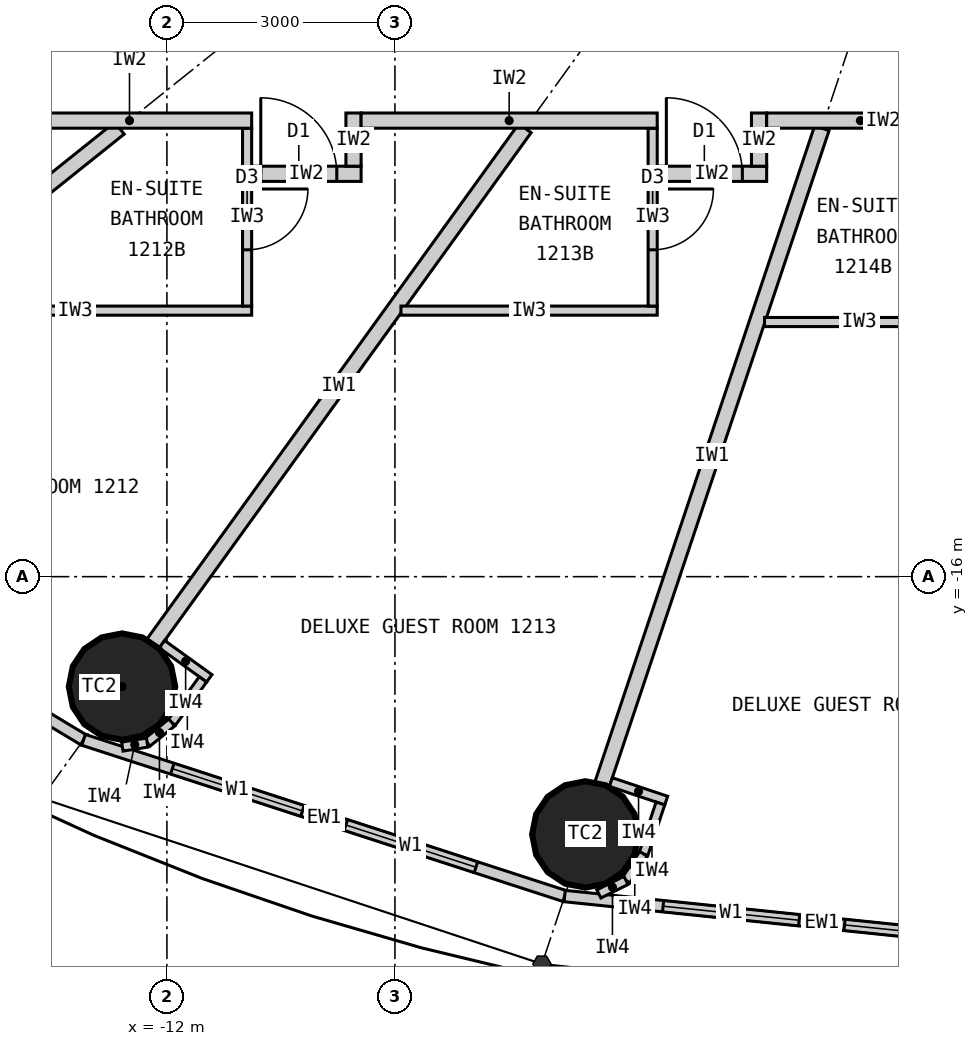
"""IFC4 building model, lengths in metres.
Left out: names, types, materials, properties, quantities, classifications, styles, units other than length and angle.
Written with IfcOpenShell. Run it as: python <this file> out.ifc"""

import sys

from ifc_helpers import new_model, si_unit, direction, frame, frame_2d, origin, origin_2d, place, context, subcontext, project, spatial, rectangle, circle, extrude, element, fill, save


model = new_model("IFC4")
c1 = context("Model", 3, precision=1e-05, world=origin(), true_north=direction((0.0, 1.0)))
c2 = subcontext(c1, "Body", "Model", "MODEL_VIEW")
j1 = project(units=[si_unit("LENGTHUNIT", "METRE"), si_unit("PLANEANGLEUNIT", "RADIAN")], contexts=[c1])
p1 = place(None, origin())
s1 = spatial("IfcSite", under=j1, at=p1, CompositionType="ELEMENT")
p2 = place(p1, origin())
s2 = spatial("IfcBuilding", under=s1, at=p2, CompositionType="ELEMENT")
p3 = place(p2, frame((0.0, 0.0, 54.0)))
s3 = spatial("IfcBuildingStorey", under=s2, at=p3, CompositionType="ELEMENT", Elevation=54.0)
for number, where, z_axis, x_axis in (
    (1, (-12.591, -17.447, 0.0), (0.0, 0.0, 1.0), (1.0, 0.0, 0.0)),
    (2, (-6.495, -19.391, 0.0), (0.0, 0.0, 1.0), (1.0, 0.0, 0.0)),
):
    element("IfcColumn", number, at=place(p3, frame(where, z_axis=z_axis, x_axis=x_axis)), inside=s3, PredefinedType="COLUMN", context=c2, shape_type="SweptSolid", body=[
        extrude(circle(Radius=0.7, at=origin_2d()), origin(), (0.0, 0.0, 1.0), 3.3),
    ])
p4 = place(p3, frame((-18.57, -14.856, 0.0), z_axis=(0.0, 0.0, 1.0), x_axis=(0.856983180864, -0.515344377787, 0.0)))
e3 = element("IfcWall", 3, at=p4, inside=s3, PredefinedType="ELEMENTEDWALL", context=c2, shape_type="SweptSolid", body=[
    extrude(rectangle(XDim=6.386, YDim=0.15, at=frame_2d((3.193, 0.0))), origin(), (0.0, 0.0, 1.0), 3.12),
])
p5 = place(p4, frame((1.093, 0.0, 0.9)))
e4 = element("IfcOpeningElement", 4, at=p5, cuts=e3, PredefinedType="OPENING", context=c2, shape_type="SweptSolid", body=[
    extrude(rectangle(XDim=1.8, YDim=1.9, at=frame_2d((0.9, 0.95))), frame((0.0, 0.085, 0.0), z_axis=(0.0, -1.0, 0.0), x_axis=(1.0, 0.0, 0.0)), (0.0, 0.0, 1.0), 0.17),
])
p6 = place(p4, frame((3.493, 0.0, 0.9)))
e5 = element("IfcOpeningElement", 5, at=p6, cuts=e3, PredefinedType="OPENING", context=c2, shape_type="SweptSolid", body=[
    extrude(rectangle(XDim=1.8, YDim=1.9, at=frame_2d((0.9, 0.95))), frame((0.0, 0.085, 0.0), z_axis=(0.0, -1.0, 0.0), x_axis=(1.0, 0.0, 0.0)), (0.0, 0.0, 1.0), 0.17),
])
p7 = place(p3, frame((-13.096, -18.147, 0.0), z_axis=(0.0, 0.0, 1.0), x_axis=(0.951137534625, -0.308767534285, 0.0)))
e6 = element("IfcWall", 6, at=p7, inside=s3, PredefinedType="ELEMENTEDWALL", context=c2, shape_type="SweptSolid", body=[
    extrude(rectangle(XDim=6.655, YDim=0.15, at=frame_2d((3.328, 0.0))), origin(), (0.0, 0.0, 1.0), 3.12),
])
p8 = place(p7, frame((1.228, 0.0, 0.9)))
e7 = element("IfcOpeningElement", 7, at=p8, cuts=e6, PredefinedType="OPENING", context=c2, shape_type="SweptSolid", body=[
    extrude(rectangle(XDim=1.8, YDim=1.9, at=frame_2d((0.9, 0.95))), frame((0.0, 0.085, 0.0), z_axis=(0.0, -1.0, 0.0), x_axis=(1.0, 0.0, 0.0)), (0.0, 0.0, 1.0), 0.17),
])
p9 = place(p7, frame((3.628, 0.0, 0.9)))
e8 = element("IfcOpeningElement", 8, at=p9, cuts=e6, PredefinedType="OPENING", context=c2, shape_type="SweptSolid", body=[
    extrude(rectangle(XDim=1.8, YDim=1.9, at=frame_2d((0.9, 0.95))), frame((0.0, 0.085, 0.0), z_axis=(0.0, -1.0, 0.0), x_axis=(1.0, 0.0, 0.0)), (0.0, 0.0, 1.0), 0.17),
])
p10 = place(p3, frame((-6.766, -20.202, 0.0), z_axis=(0.0, 0.0, 1.0), x_axis=(0.994721394369, -0.102612609291, 0.0)))
e9 = element("IfcWall", 9, at=p10, inside=s3, PredefinedType="ELEMENTEDWALL", context=c2, shape_type="SweptSolid", body=[
    extrude(rectangle(XDim=6.802, YDim=0.15, at=frame_2d((3.401, 0.0))), origin(), (0.0, 0.0, 1.0), 3.12),
])
p11 = place(p10, frame((1.301, 0.0, 0.9)))
e10 = element("IfcOpeningElement", 10, at=p11, cuts=e9, PredefinedType="OPENING", context=c2, shape_type="SweptSolid", body=[
    extrude(rectangle(XDim=1.8, YDim=1.9, at=frame_2d((0.9, 0.95))), frame((0.0, 0.085, 0.0), z_axis=(0.0, -1.0, 0.0), x_axis=(1.0, 0.0, 0.0)), (0.0, 0.0, 1.0), 0.17),
])
p12 = place(p10, frame((3.701, 0.0, 0.9)))
e11 = element("IfcOpeningElement", 11, at=p12, cuts=e9, PredefinedType="OPENING", context=c2, shape_type="SweptSolid", body=[
    extrude(rectangle(XDim=1.8, YDim=1.9, at=frame_2d((0.9, 0.95))), frame((0.0, 0.085, 0.0), z_axis=(0.0, -1.0, 0.0), x_axis=(1.0, 0.0, 0.0)), (0.0, 0.0, 1.0), 0.17),
])
p13 = place(p3, frame((-12.625, -10.1, 0.0), z_axis=(0.0, 0.0, 1.0), x_axis=(-0.780892451574, -0.624665493744, 0.0)))
e12 = element("IfcWall", 12, at=p13, inside=s3, PredefinedType="PARTITIONING", context=c2, shape_type="SweptSolid", body=[
    extrude(rectangle(XDim=6.045, YDim=0.2, at=frame_2d((3.022, 0.0))), origin(), (0.0, 0.0, 1.0), 2.32),
])
p14 = place(p3, frame((-7.289, -10.1, 0.0), z_axis=(0.0, 0.0, 1.0), x_axis=(-0.585198353053, -0.810890182197, 0.0)))
e13 = element("IfcWall", 13, at=p14, inside=s3, PredefinedType="PARTITIONING", context=c2, shape_type="SweptSolid", body=[
    extrude(rectangle(XDim=8.36, YDim=0.2, at=frame_2d((4.18, 0.0))), origin(), (0.0, 0.0, 1.0), 2.32),
])
p15 = place(p3, frame((-3.383, -10.1, 0.0), z_axis=(0.0, 0.0, 1.0), x_axis=(-0.31759592231, -0.948226149256, 0.0)))
e14 = element("IfcWall", 14, at=p15, inside=s3, PredefinedType="PARTITIONING", context=c2, shape_type="SweptSolid", body=[
    extrude(rectangle(XDim=9.098, YDim=0.2, at=frame_2d((4.549, 0.0))), origin(), (0.0, 0.0, 1.0), 2.32),
])
p16 = place(p3, frame((-15.525, -12.5, 0.0), z_axis=(0.0, 0.0, 1.0), x_axis=(1.0, 0.0, 0.0)))
e15 = element("IfcWall", 15, at=p16, inside=s3, PredefinedType="PARTITIONING", context=c2, shape_type="SweptSolid", body=[
    extrude(rectangle(XDim=4.64, YDim=0.12, at=frame_2d((2.32, 0.0))), origin(), (0.0, 0.0, 1.0), 3.12),
])
p17 = place(p3, frame((-10.945, -10.1, 0.0), z_axis=(0.0, 0.0, 1.0), x_axis=(0.0, -1.0, 0.0)))
e16 = element("IfcWall", 16, at=p17, inside=s3, PredefinedType="PARTITIONING", context=c2, shape_type="SweptSolid", body=[
    extrude(rectangle(XDim=2.34, YDim=0.12, at=frame_2d((1.17, 0.0))), origin(), (0.0, 0.0, 1.0), 3.12),
])
p18 = place(p17, frame((0.8, 0.0, 0.0)))
e17 = element("IfcOpeningElement", 17, at=p18, cuts=e16, PredefinedType="OPENING", context=c2, shape_type="SweptSolid", body=[
    extrude(rectangle(XDim=0.8, YDim=2.1, at=frame_2d((0.4, 1.05))), frame((0.0, 0.07, 0.0), z_axis=(0.0, -1.0, 0.0), x_axis=(1.0, 0.0, 0.0)), (0.0, 0.0, 1.0), 0.14),
])
p19 = place(p3, frame((-8.921, -12.5, 0.0), z_axis=(0.0, 0.0, 1.0), x_axis=(1.0, 0.0, 0.0)))
e18 = element("IfcWall", 18, at=p19, inside=s3, PredefinedType="PARTITIONING", context=c2, shape_type="SweptSolid", body=[
    extrude(rectangle(XDim=3.372, YDim=0.12, at=frame_2d((1.686, 0.0))), origin(), (0.0, 0.0, 1.0), 3.12),
])
p20 = place(p3, frame((-5.609, -10.1, 0.0), z_axis=(0.0, 0.0, 1.0), x_axis=(0.0, -1.0, 0.0)))
e19 = element("IfcWall", 19, at=p20, inside=s3, PredefinedType="PARTITIONING", context=c2, shape_type="SweptSolid", body=[
    extrude(rectangle(XDim=2.34, YDim=0.12, at=frame_2d((1.17, 0.0))), origin(), (0.0, 0.0, 1.0), 3.12),
])
p21 = place(p20, frame((0.8, 0.0, 0.0)))
e20 = element("IfcOpeningElement", 20, at=p21, cuts=e19, PredefinedType="OPENING", context=c2, shape_type="SweptSolid", body=[
    extrude(rectangle(XDim=0.8, YDim=2.1, at=frame_2d((0.4, 1.05))), frame((0.0, 0.07, 0.0), z_axis=(0.0, -1.0, 0.0), x_axis=(1.0, 0.0, 0.0)), (0.0, 0.0, 1.0), 0.14),
])
p22 = place(p3, frame((-4.137, -12.65, 0.0), z_axis=(0.0, 0.0, 1.0), x_axis=(1.0, 0.0, 0.0)))
e21 = element("IfcWall", 21, at=p22, inside=s3, PredefinedType="PARTITIONING", context=c2, shape_type="SweptSolid", body=[
    extrude(rectangle(XDim=2.494, YDim=0.12, at=frame_2d((1.247, 0.0))), origin(), (0.0, 0.0, 1.0), 3.12),
])
p23 = place(p3, frame((-9.445, -10.7, 0.0), z_axis=(0.0, 0.0, 1.0), x_axis=(-1.0, 0.0, 0.0)))
e22 = element("IfcWall", 22, at=p23, inside=s3, PredefinedType="PARTITIONING", context=c2, shape_type="SweptSolid", body=[
    extrude(rectangle(XDim=1.44, YDim=0.2, at=frame_2d((0.72, 0.0))), origin(), (0.0, 0.0, 1.0), 3.12),
])
p24 = place(p23, frame((0.32, 0.0, 0.0)))
e23 = element("IfcOpeningElement", 23, at=p24, cuts=e22, PredefinedType="OPENING", context=c2, shape_type="SweptSolid", body=[
    extrude(rectangle(XDim=1.0, YDim=2.2, at=frame_2d((0.5, 1.1))), frame((0.0, 0.11, 0.0), z_axis=(0.0, -1.0, 0.0), x_axis=(1.0, 0.0, 0.0)), (0.0, 0.0, 1.0), 0.22),
])
p25 = place(p3, frame((-9.545, -9.9, 0.0), z_axis=(0.0, 0.0, 1.0), x_axis=(0.0, -1.0, 0.0)))
e24 = element("IfcWall", 24, at=p25, inside=s3, PredefinedType="PARTITIONING", context=c2, shape_type="SweptSolid", body=[
    extrude(rectangle(XDim=0.7, YDim=0.2, at=frame_2d((0.35, 0.0))), origin(), (0.0, 0.0, 1.0), 3.12),
])
p26 = place(p3, frame((-4.109, -10.7, 0.0), z_axis=(0.0, 0.0, 1.0), x_axis=(-1.0, 0.0, 0.0)))
e25 = element("IfcWall", 25, at=p26, inside=s3, PredefinedType="PARTITIONING", context=c2, shape_type="SweptSolid", body=[
    extrude(rectangle(XDim=1.44, YDim=0.2, at=frame_2d((0.72, 0.0))), origin(), (0.0, 0.0, 1.0), 3.12),
])
p27 = place(p26, frame((0.32, 0.0, 0.0)))
e26 = element("IfcOpeningElement", 26, at=p27, cuts=e25, PredefinedType="OPENING", context=c2, shape_type="SweptSolid", body=[
    extrude(rectangle(XDim=1.0, YDim=2.2, at=frame_2d((0.5, 1.1))), frame((0.0, 0.11, 0.0), z_axis=(0.0, -1.0, 0.0), x_axis=(1.0, 0.0, 0.0)), (0.0, 0.0, 1.0), 0.22),
])
p28 = place(p3, frame((-4.209, -9.9, 0.0), z_axis=(0.0, 0.0, 1.0), x_axis=(0.0, -1.0, 0.0)))
e27 = element("IfcWall", 27, at=p28, inside=s3, PredefinedType="PARTITIONING", context=c2, shape_type="SweptSolid", body=[
    extrude(rectangle(XDim=0.7, YDim=0.2, at=frame_2d((0.35, 0.0))), origin(), (0.0, 0.0, 1.0), 3.12),
])
p29 = place(p3, frame((-1.643, -10.0, 0.0), z_axis=(0.0, 0.0, 1.0), x_axis=(-1.0, 0.0, 0.0)))
e28 = element("IfcWall", 28, at=p29, inside=s3, PredefinedType="PARTITIONING", context=c2, shape_type="SweptSolid", body=[
    extrude(rectangle(XDim=2.466, YDim=0.2, at=frame_2d((1.233, 0.0))), origin(), (0.0, 0.0, 1.0), 3.12),
])
p30 = place(p3, frame((-5.549, -10.0, 0.0), z_axis=(0.0, 0.0, 1.0), x_axis=(-1.0, 0.0, 0.0)))
e29 = element("IfcWall", 29, at=p30, inside=s3, PredefinedType="PARTITIONING", context=c2, shape_type="SweptSolid", body=[
    extrude(rectangle(XDim=3.896, YDim=0.2, at=frame_2d((1.948, 0.0))), origin(), (0.0, 0.0, 1.0), 3.12),
])
p31 = place(p3, frame((-10.885, -10.0, 0.0), z_axis=(0.0, 0.0, 1.0), x_axis=(-1.0, 0.0, 0.0)))
e30 = element("IfcWall", 30, at=p31, inside=s3, PredefinedType="PARTITIONING", context=c2, shape_type="SweptSolid", body=[
    extrude(rectangle(XDim=3.215, YDim=0.2, at=frame_2d((1.607, 0.0))), origin(), (0.0, 0.0, 1.0), 3.12),
])
p32 = place(p3, frame((-12.065, -16.889, 0.0), z_axis=(0.0, 0.0, 1.0), x_axis=(0.810821798253, -0.585293098778, 0.0)))
e31 = element("IfcWall", 31, at=p32, inside=s3, PredefinedType="PARTITIONING", context=c2, shape_type="SweptSolid", body=[
    extrude(rectangle(XDim=0.768, YDim=0.12, at=frame_2d((0.384, 0.0))), origin(), (0.0, 0.0, 1.0), 3.12),
])
p33 = place(p3, frame((-11.526, -17.351, 0.0), z_axis=(0.0, 0.0, 1.0), x_axis=(-0.585223113993, -0.810872312296, 0.0)))
e32 = element("IfcWall", 32, at=p33, inside=s3, PredefinedType="PARTITIONING", context=c2, shape_type="SweptSolid", body=[
    extrude(rectangle(XDim=0.7, YDim=0.12, at=frame_2d((0.35, 0.0))), origin(), (0.0, 0.0, 1.0), 3.12),
])
p34 = place(p3, frame((-11.936, -17.919, 0.0), z_axis=(0.0, 0.0, 1.0), x_axis=(-0.775023088441, -0.631932917629, 0.0)))
e33 = element("IfcWall", 33, at=p34, inside=s3, PredefinedType="PARTITIONING", context=c2, shape_type="SweptSolid", body=[
    extrude(rectangle(XDim=0.418, YDim=0.12, at=frame_2d((0.209, 0.0))), origin(), (0.0, 0.0, 1.0), 3.12),
])
p35 = place(p3, frame((-12.26, -18.183, 0.0), z_axis=(0.0, 0.0, 1.0), x_axis=(-0.987218661664, -0.159371622511, 0.0)))
e34 = element("IfcWall", 34, at=p35, inside=s3, PredefinedType="PARTITIONING", context=c2, shape_type="SweptSolid", body=[
    extrude(rectangle(XDim=0.331, YDim=0.12, at=frame_2d((0.166, 0.0))), origin(), (0.0, 0.0, 1.0), 3.12),
])
p36 = place(p3, frame((-6.159, -18.702, 0.0), z_axis=(0.0, 0.0, 1.0), x_axis=(0.948173154049, -0.31775410295, 0.0)))
e35 = element("IfcWall", 35, at=p36, inside=s3, PredefinedType="PARTITIONING", context=c2, shape_type="SweptSolid", body=[
    extrude(rectangle(XDim=0.768, YDim=0.12, at=frame_2d((0.384, 0.0))), origin(), (0.0, 0.0, 1.0), 3.12),
])
p37 = place(p3, frame((-5.507, -18.984, 0.0), z_axis=(0.0, 0.0, 1.0), x_axis=(-0.317692050622, -0.948193946918, 0.0)))
e36 = element("IfcWall", 36, at=p37, inside=s3, PredefinedType="PARTITIONING", context=c2, shape_type="SweptSolid", body=[
    extrude(rectangle(XDim=0.7, YDim=0.12, at=frame_2d((0.35, 0.0))), origin(), (0.0, 0.0, 1.0), 3.12),
])
p38 = place(p3, frame((-5.729, -19.648, 0.0), z_axis=(0.0, 0.0, 1.0), x_axis=(-0.552135764955, -0.833754218615, 0.0)))
e37 = element("IfcWall", 37, at=p38, inside=s3, PredefinedType="PARTITIONING", context=c2, shape_type="SweptSolid", body=[
    extrude(rectangle(XDim=0.418, YDim=0.12, at=frame_2d((0.209, 0.0))), origin(), (0.0, 0.0, 1.0), 3.12),
])
p39 = place(p3, frame((-5.96, -19.996, 0.0), z_axis=(0.0, 0.0, 1.0), x_axis=(-0.895160725913, -0.445743507842, 0.0)))
e38 = element("IfcWall", 38, at=p39, inside=s3, PredefinedType="PARTITIONING", context=c2, shape_type="SweptSolid", body=[
    extrude(rectangle(XDim=0.399, YDim=0.12, at=frame_2d((0.199, 0.0))), origin(), (0.0, 0.0, 1.0), 3.12),
])
p40 = place(p8, origin())
e39 = element("IfcWindow", 39, at=p40, inside=s3, PartitioningType="SINGLE_PANEL", PredefinedType="WINDOW", context=c2, shape_type="SweptSolid", body=[
    extrude(rectangle(XDim=1.8, YDim=1.9, at=frame_2d((0.9, 0.95))), frame((0.0, 0.03, 0.0), z_axis=(0.0, -1.0, 0.0), x_axis=(1.0, 0.0, 0.0)), (0.0, 0.0, 1.0), 0.06),
])
fill(e7, e39)
p41 = place(p9, origin())
e40 = element("IfcWindow", 40, at=p41, inside=s3, PartitioningType="SINGLE_PANEL", PredefinedType="WINDOW", context=c2, shape_type="SweptSolid", body=[
    extrude(rectangle(XDim=1.8, YDim=1.9, at=frame_2d((0.9, 0.95))), frame((0.0, 0.03, 0.0), z_axis=(0.0, -1.0, 0.0), x_axis=(1.0, 0.0, 0.0)), (0.0, 0.0, 1.0), 0.06),
])
fill(e8, e40)
p42 = place(p11, origin())
e41 = element("IfcWindow", 41, at=p42, inside=s3, PartitioningType="SINGLE_PANEL", PredefinedType="WINDOW", context=c2, shape_type="SweptSolid", body=[
    extrude(rectangle(XDim=1.8, YDim=1.9, at=frame_2d((0.9, 0.95))), frame((0.0, 0.03, 0.0), z_axis=(0.0, -1.0, 0.0), x_axis=(1.0, 0.0, 0.0)), (0.0, 0.0, 1.0), 0.06),
])
fill(e10, e41)
p43 = place(p12, origin())
e42 = element("IfcWindow", 42, at=p43, inside=s3, PartitioningType="SINGLE_PANEL", PredefinedType="WINDOW", context=c2, shape_type="SweptSolid", body=[
    extrude(rectangle(XDim=1.8, YDim=1.9, at=frame_2d((0.9, 0.95))), frame((0.0, 0.03, 0.0), z_axis=(0.0, -1.0, 0.0), x_axis=(1.0, 0.0, 0.0)), (0.0, 0.0, 1.0), 0.06),
])
fill(e11, e42)
p44 = place(p18, origin())
e43 = element("IfcDoor", 43, at=p44, inside=s3, OperationType="SINGLE_SWING_LEFT", PredefinedType="DOOR", context=c2, shape_type="SweptSolid", body=[
    extrude(rectangle(XDim=0.8, YDim=2.1, at=frame_2d((0.4, 1.05))), frame((0.0, 0.025, 0.0), z_axis=(0.0, -1.0, 0.0), x_axis=(1.0, 0.0, 0.0)), (0.0, 0.0, 1.0), 0.05),
])
fill(e17, e43)
p45 = place(p24, origin())
e44 = element("IfcDoor", 44, at=p45, inside=s3, OperationType="SINGLE_SWING_RIGHT", PredefinedType="DOOR", context=c2, shape_type="SweptSolid", body=[
    extrude(rectangle(XDim=1.0, YDim=2.2, at=frame_2d((0.5, 1.1))), frame((0.0, 0.025, 0.0), z_axis=(0.0, -1.0, 0.0), x_axis=(1.0, 0.0, 0.0)), (0.0, 0.0, 1.0), 0.05),
])
fill(e23, e44)
p46 = place(p21, origin())
e45 = element("IfcDoor", 45, at=p46, inside=s3, OperationType="SINGLE_SWING_LEFT", PredefinedType="DOOR", context=c2, shape_type="SweptSolid", body=[
    extrude(rectangle(XDim=0.8, YDim=2.1, at=frame_2d((0.4, 1.05))), frame((0.0, 0.025, 0.0), z_axis=(0.0, -1.0, 0.0), x_axis=(1.0, 0.0, 0.0)), (0.0, 0.0, 1.0), 0.05),
])
fill(e20, e45)
p47 = place(p27, origin())
e46 = element("IfcDoor", 46, at=p47, inside=s3, OperationType="SINGLE_SWING_RIGHT", PredefinedType="DOOR", context=c2, shape_type="SweptSolid", body=[
    extrude(rectangle(XDim=1.0, YDim=2.2, at=frame_2d((0.5, 1.1))), frame((0.0, 0.025, 0.0), z_axis=(0.0, -1.0, 0.0), x_axis=(1.0, 0.0, 0.0)), (0.0, 0.0, 1.0), 0.05),
])
fill(e26, e46)
save(model, sys.argv[1])
